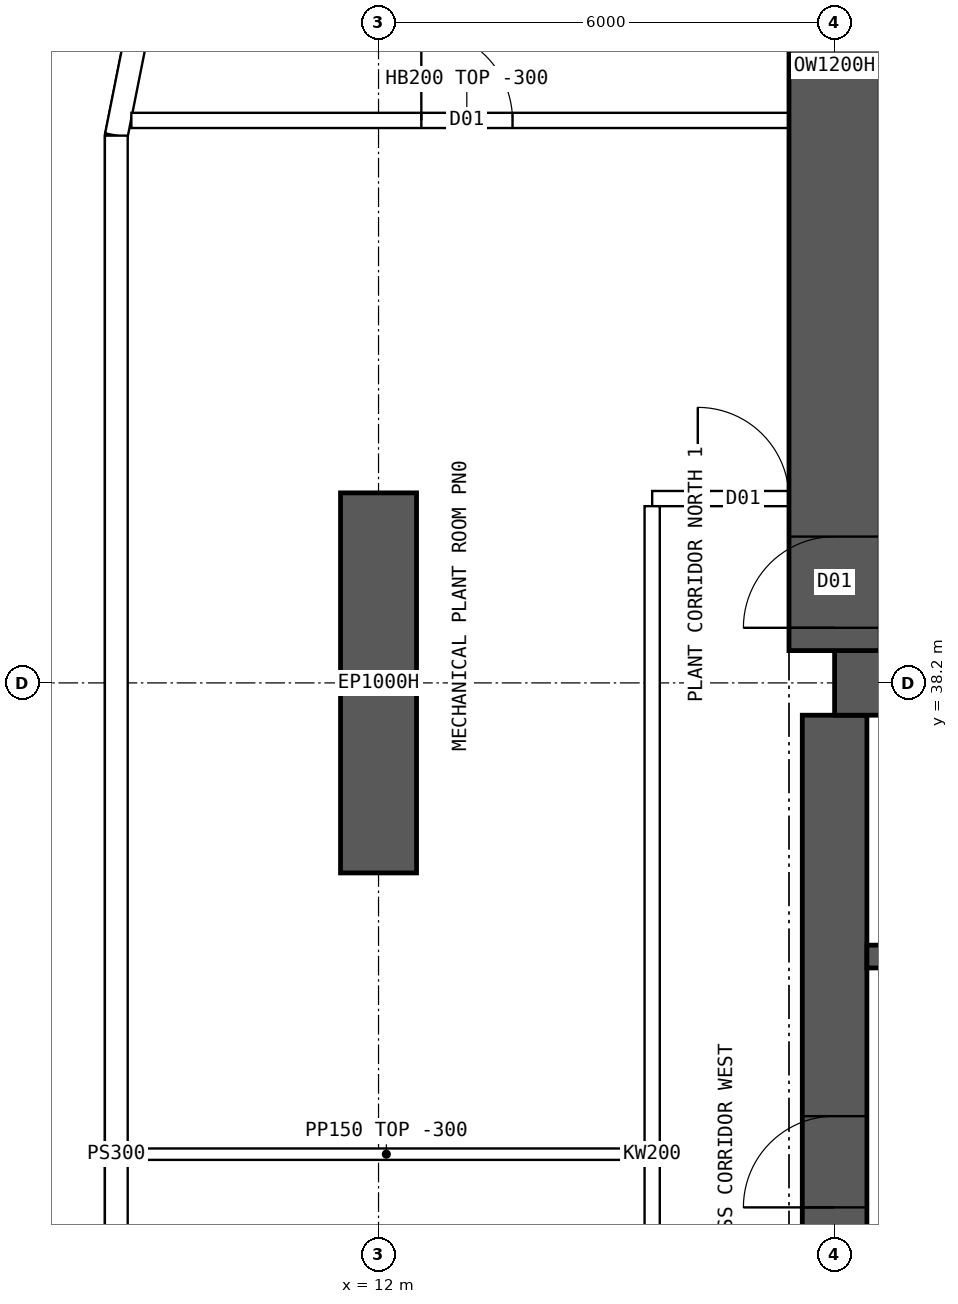
"""IFC4 building model, lengths in metres.
Left out: names, types, materials, properties, quantities, classifications, styles, units other than length and angle.
Written with IfcOpenShell. Run it as: python <this file> out.ifc"""

import sys

from ifc_helpers import new_model, si_unit, direction, frame, frame_2d, origin, place, context, subcontext, project, spatial, polyline, rectangle, outline, extrude, clip, halfspace, element, fill, save


model = new_model("IFC4")
c1 = context("Model", 3, precision=1e-05, world=origin(), true_north=direction((0.0, 1.0)))
c2 = subcontext(c1, "Body", "Model", "MODEL_VIEW")
j1 = project(units=[si_unit("LENGTHUNIT", "METRE"), si_unit("PLANEANGLEUNIT", "RADIAN")], contexts=[c1])
p1 = place(None, origin())
s1 = spatial("IfcSite", under=j1, at=p1, CompositionType="ELEMENT")
p2 = place(p1, origin())
s2 = spatial("IfcBuilding", under=s1, at=p2, CompositionType="ELEMENT")
p3 = place(p2, frame((0.0, 0.0, 201.1)))
s3 = spatial("IfcBuildingStorey", under=s2, at=p3, CompositionType="ELEMENT", Elevation=201.1)
p4 = place(p3, frame((12.0, 35.7, 0.0), z_axis=(0.0, 0.0, 1.0), x_axis=(0.0, 1.0, 0.0)))
e1 = element("IfcWall", 1, at=p4, inside=s3, PredefinedType="SHEAR", context=c2, shape_type="SweptSolid", body=[
    extrude(rectangle(XDim=5.0, YDim=1.0, at=frame_2d((2.5, 0.0))), origin(), (0.0, 0.0, 1.0), 7.2),
])
p5 = place(p3, frame((18.0, 38.2, 0.0), z_axis=(0.0, 0.0, 1.0), x_axis=(1.0, 0.0, 0.0)))
e2 = element("IfcWall", 2, at=p5, inside=s3, PredefinedType="SHEAR", context=c2, shape_type="SweptSolid", body=[
    extrude(rectangle(XDim=48.0, YDim=0.85, at=frame_2d((24.0, 0.0))), origin(), (0.0, 0.0, 1.0), 7.2),
])
p6 = place(p3, frame((18.0, 26.225, 0.0), z_axis=(0.0, 0.0, 1.0), x_axis=(0.0, 1.0, 0.0)))
e3 = element("IfcWall", 3, at=p6, inside=s3, PredefinedType="SHEAR", context=c2, shape_type="SweptSolid", body=[
    extrude(rectangle(XDim=11.55, YDim=0.85, at=frame_2d((5.775, 0.0))), origin(), (0.0, 0.0, 1.0), 7.2),
])
p7 = place(p6, frame((5.075, 0.0, 0.0)))
e4 = element("IfcOpeningElement", 4, at=p7, cuts=e3, PredefinedType="OPENING", context=c2, shape_type="SweptSolid", body=[
    extrude(rectangle(XDim=1.2, YDim=2.1, at=frame_2d((0.6, 1.05))), frame((0.0, 0.435, 0.0), z_axis=(0.0, -1.0, 0.0), x_axis=(1.0, 0.0, 0.0)), (0.0, 0.0, 1.0), 0.87),
])
p8 = place(p3, frame((18.425, 34.6, 0.0), z_axis=(0.0, 0.0, 1.0), x_axis=(1.0, 0.0, 0.0)))
e5 = element("IfcWall", 5, at=p8, inside=s3, PredefinedType="SHEAR", context=c2, shape_type="SweptSolid", body=[
    extrude(rectangle(XDim=47.15, YDim=0.3, at=frame_2d((23.575, 0.0))), origin(), (0.0, 0.0, 1.0), 7.2),
])
p9 = place(p8, frame((0.9, 0.0, 0.0)))
e6 = element("IfcOpeningElement", 6, at=p9, cuts=e5, PredefinedType="OPENING", context=c2, shape_type="SweptSolid", body=[
    extrude(rectangle(XDim=1.1, YDim=2.1, at=frame_2d((0.55, 1.05))), frame((0.0, 0.16, 0.0), z_axis=(0.0, -1.0, 0.0), x_axis=(1.0, 0.0, 0.0)), (0.0, 0.0, 1.0), 0.32),
])
p10 = place(p8, frame((45.15, 0.0, 0.0)))
e7 = element("IfcOpeningElement", 7, at=p10, cuts=e5, PredefinedType="OPENING", context=c2, shape_type="SweptSolid", body=[
    extrude(rectangle(XDim=1.1, YDim=2.1, at=frame_2d((0.55, 1.05))), frame((0.0, 0.16, 0.0), z_axis=(0.0, -1.0, 0.0), x_axis=(1.0, 0.0, 0.0)), (0.0, 0.0, 1.0), 0.32),
])
p11 = place(p8, frame((4.175, 0.0, 0.0)))
e8 = element("IfcOpeningElement", 8, at=p11, cuts=e5, PredefinedType="OPENING", context=c2, shape_type="SweptSolid", body=[
    extrude(rectangle(XDim=0.9, YDim=2.1, at=frame_2d((0.45, 1.05))), frame((0.0, 0.16, 0.0), z_axis=(0.0, -1.0, 0.0), x_axis=(1.0, 0.0, 0.0)), (0.0, 0.0, 1.0), 0.32),
])
p12 = place(p8, frame((42.075, 0.0, 0.0)))
e9 = element("IfcOpeningElement", 9, at=p12, cuts=e5, PredefinedType="OPENING", context=c2, shape_type="SweptSolid", body=[
    extrude(rectangle(XDim=0.9, YDim=2.1, at=frame_2d((0.45, 1.05))), frame((0.0, 0.16, 0.0), z_axis=(0.0, -1.0, 0.0), x_axis=(1.0, 0.0, 0.0)), (0.0, 0.0, 1.0), 0.32),
])
p13 = place(p8, frame((8.95, 0.0, 0.0)))
e10 = element("IfcOpeningElement", 10, at=p13, cuts=e5, PredefinedType="OPENING", context=c2, shape_type="SweptSolid", body=[
    extrude(rectangle(XDim=0.9, YDim=2.1, at=frame_2d((0.45, 1.05))), frame((0.0, 0.16, 0.0), z_axis=(0.0, -1.0, 0.0), x_axis=(1.0, 0.0, 0.0)), (0.0, 0.0, 1.0), 0.32),
])
p14 = place(p8, frame((12.924, 0.0, 0.0)))
e11 = element("IfcOpeningElement", 11, at=p14, cuts=e5, PredefinedType="OPENING", context=c2, shape_type="SweptSolid", body=[
    extrude(rectangle(XDim=0.9, YDim=2.1, at=frame_2d((0.45, 1.05))), frame((0.0, 0.16, 0.0), z_axis=(0.0, -1.0, 0.0), x_axis=(1.0, 0.0, 0.0)), (0.0, 0.0, 1.0), 0.32),
])
p15 = place(p8, frame((16.571, 0.0, 0.0)))
e12 = element("IfcOpeningElement", 12, at=p15, cuts=e5, PredefinedType="OPENING", context=c2, shape_type="SweptSolid", body=[
    extrude(rectangle(XDim=0.9, YDim=2.1, at=frame_2d((0.45, 1.05))), frame((0.0, 0.16, 0.0), z_axis=(0.0, -1.0, 0.0), x_axis=(1.0, 0.0, 0.0)), (0.0, 0.0, 1.0), 0.32),
])
p16 = place(p8, frame((20.33, 0.0, 0.0)))
e13 = element("IfcOpeningElement", 13, at=p16, cuts=e5, PredefinedType="OPENING", context=c2, shape_type="SweptSolid", body=[
    extrude(rectangle(XDim=0.9, YDim=2.1, at=frame_2d((0.45, 1.05))), frame((0.0, 0.16, 0.0), z_axis=(0.0, -1.0, 0.0), x_axis=(1.0, 0.0, 0.0)), (0.0, 0.0, 1.0), 0.32),
])
p17 = place(p8, frame((24.736, 0.0, 0.0)))
e14 = element("IfcOpeningElement", 14, at=p17, cuts=e5, PredefinedType="OPENING", context=c2, shape_type="SweptSolid", body=[
    extrude(rectangle(XDim=0.9, YDim=2.1, at=frame_2d((0.45, 1.05))), frame((0.0, 0.16, 0.0), z_axis=(0.0, -1.0, 0.0), x_axis=(1.0, 0.0, 0.0)), (0.0, 0.0, 1.0), 0.32),
])
p18 = place(p8, frame((27.533, 0.0, 0.0)))
e15 = element("IfcOpeningElement", 15, at=p18, cuts=e5, PredefinedType="OPENING", context=c2, shape_type="SweptSolid", body=[
    extrude(rectangle(XDim=0.9, YDim=2.1, at=frame_2d((0.45, 1.05))), frame((0.0, 0.16, 0.0), z_axis=(0.0, -1.0, 0.0), x_axis=(1.0, 0.0, 0.0)), (0.0, 0.0, 1.0), 0.32),
])
p19 = place(p8, frame((29.906, 0.0, 0.0)))
e16 = element("IfcOpeningElement", 16, at=p19, cuts=e5, PredefinedType="OPENING", context=c2, shape_type="SweptSolid", body=[
    extrude(rectangle(XDim=0.9, YDim=2.1, at=frame_2d((0.45, 1.05))), frame((0.0, 0.16, 0.0), z_axis=(0.0, -1.0, 0.0), x_axis=(1.0, 0.0, 0.0)), (0.0, 0.0, 1.0), 0.32),
])
p20 = place(p8, frame((35.376, 0.0, 0.0)))
e17 = element("IfcOpeningElement", 17, at=p20, cuts=e5, PredefinedType="OPENING", context=c2, shape_type="SweptSolid", body=[
    extrude(rectangle(XDim=0.9, YDim=2.1, at=frame_2d((0.45, 1.05))), frame((0.0, 0.16, 0.0), z_axis=(0.0, -1.0, 0.0), x_axis=(1.0, 0.0, 0.0)), (0.0, 0.0, 1.0), 0.32),
])
p21 = place(p3, frame((18.0, 38.625, 0.0), z_axis=(0.0, 0.0, 1.0), x_axis=(0.0, 1.0, 0.0)))
e18 = element("IfcWall", 18, at=p21, inside=s3, PredefinedType="SHEAR", context=c2, shape_type="SweptSolid", body=[
    extrude(rectangle(XDim=15.375, YDim=1.2, at=frame_2d((7.688, 0.0))), origin(), (0.0, 0.0, 1.0), 7.2),
])
p22 = place(p21, frame((0.3, 0.0, 0.0)))
e19 = element("IfcOpeningElement", 19, at=p22, cuts=e18, PredefinedType="OPENING", context=c2, shape_type="SweptSolid", body=[
    extrude(rectangle(XDim=1.2, YDim=2.1, at=frame_2d((0.6, 1.05))), frame((0.0, 0.61, 0.0), z_axis=(0.0, -1.0, 0.0), x_axis=(1.0, 0.0, 0.0)), (0.0, 0.0, 1.0), 1.22),
])
p23 = place(p21, frame((10.225, 0.0, 0.0)))
e20 = element("IfcOpeningElement", 20, at=p23, cuts=e18, PredefinedType="OPENING", context=c2, shape_type="SweptSolid", body=[
    extrude(rectangle(XDim=1.2, YDim=2.1, at=frame_2d((0.6, 1.05))), frame((0.0, 0.61, 0.0), z_axis=(0.0, -1.0, 0.0), x_axis=(1.0, 0.0, 0.0)), (0.0, 0.0, 1.0), 1.22),
])
p24 = place(p3, frame((8.55, 45.4, 0.0), z_axis=(0.0, 0.0, 1.0), x_axis=(0.0, -1.0, 0.0)))
e21 = element("IfcWall", 21, at=p24, inside=s3, PredefinedType="SOLIDWALL", context=c2, shape_type="SweptSolid", body=[
    extrude(outline(polyline([(-0.015, -0.15), (26.815, -0.15), (26.785, 0.15), (0.015, 0.15), (-0.015, -0.15)])), origin(), (0.0, 0.0, 1.0), 6.9),
])
p25 = place(p3, frame((9.208, 48.71, 0.0), z_axis=(0.0, 0.0, 1.0), x_axis=(-0.19508664885, -0.980786011034, 0.0)))
e22 = element("IfcWall", 22, at=p25, inside=s3, PredefinedType="SOLIDWALL", context=c2, shape_type="SweptSolid", body=[
    extrude(outline(polyline([(-0.03, -0.15), (3.39, -0.15), (3.36, 0.15), (0.03, 0.15), (-0.03, -0.15)])), origin(), (0.0, 0.0, 1.0), 6.9),
])
p26 = place(p3, frame((15.6, 40.625, 0.0), z_axis=(0.0, 0.0, 1.0), x_axis=(1.0, 0.0, 0.0)))
e23 = element("IfcWall", 23, at=p26, inside=s3, PredefinedType="SOLIDWALL", context=c2, shape_type="SweptSolid", body=[
    extrude(rectangle(XDim=52.8, YDim=0.2, at=frame_2d((26.4, 0.0))), origin(), (0.0, 0.0, 1.0), 6.9),
])
p27 = place(p26, frame((0.6, 0.0, 0.0)))
e24 = element("IfcOpeningElement", 24, at=p27, cuts=e23, PredefinedType="OPENING", context=c2, shape_type="SweptSolid", body=[
    extrude(rectangle(XDim=1.2, YDim=2.1, at=frame_2d((0.6, 1.05))), frame((0.0, 0.11, 0.0), z_axis=(0.0, -1.0, 0.0), x_axis=(1.0, 0.0, 0.0)), (0.0, 0.0, 1.0), 0.22),
])
p28 = place(p26, frame((3.425, 0.0, 0.0)))
e25 = element("IfcOpeningElement", 25, at=p28, cuts=e23, PredefinedType="OPENING", context=c2, shape_type="SweptSolid", body=[
    extrude(rectangle(XDim=1.8, YDim=2.4, at=frame_2d((0.9, 1.2))), frame((0.0, 0.11, 0.0), z_axis=(0.0, -1.0, 0.0), x_axis=(1.0, 0.0, 0.0)), (0.0, 0.0, 1.0), 0.22),
])
p29 = place(p26, frame((9.425, 0.0, 0.0)))
e26 = element("IfcOpeningElement", 26, at=p29, cuts=e23, PredefinedType="OPENING", context=c2, shape_type="SweptSolid", body=[
    extrude(rectangle(XDim=1.8, YDim=2.4, at=frame_2d((0.9, 1.2))), frame((0.0, 0.11, 0.0), z_axis=(0.0, -1.0, 0.0), x_axis=(1.0, 0.0, 0.0)), (0.0, 0.0, 1.0), 0.22),
])
p30 = place(p26, frame((15.425, 0.0, 0.0)))
e27 = element("IfcOpeningElement", 27, at=p30, cuts=e23, PredefinedType="OPENING", context=c2, shape_type="SweptSolid", body=[
    extrude(rectangle(XDim=1.8, YDim=2.4, at=frame_2d((0.9, 1.2))), frame((0.0, 0.11, 0.0), z_axis=(0.0, -1.0, 0.0), x_axis=(1.0, 0.0, 0.0)), (0.0, 0.0, 1.0), 0.22),
])
p31 = place(p26, frame((21.425, 0.0, 0.0)))
e28 = element("IfcOpeningElement", 28, at=p31, cuts=e23, PredefinedType="OPENING", context=c2, shape_type="SweptSolid", body=[
    extrude(rectangle(XDim=1.8, YDim=2.4, at=frame_2d((0.9, 1.2))), frame((0.0, 0.11, 0.0), z_axis=(0.0, -1.0, 0.0), x_axis=(1.0, 0.0, 0.0)), (0.0, 0.0, 1.0), 0.22),
])
p32 = place(p26, frame((27.425, 0.0, 0.0)))
e29 = element("IfcOpeningElement", 29, at=p32, cuts=e23, PredefinedType="OPENING", context=c2, shape_type="SweptSolid", body=[
    extrude(rectangle(XDim=1.8, YDim=2.4, at=frame_2d((0.9, 1.2))), frame((0.0, 0.11, 0.0), z_axis=(0.0, -1.0, 0.0), x_axis=(1.0, 0.0, 0.0)), (0.0, 0.0, 1.0), 0.22),
])
p33 = place(p26, frame((33.425, 0.0, 0.0)))
e30 = element("IfcOpeningElement", 30, at=p33, cuts=e23, PredefinedType="OPENING", context=c2, shape_type="SweptSolid", body=[
    extrude(rectangle(XDim=1.8, YDim=2.4, at=frame_2d((0.9, 1.2))), frame((0.0, 0.11, 0.0), z_axis=(0.0, -1.0, 0.0), x_axis=(1.0, 0.0, 0.0)), (0.0, 0.0, 1.0), 0.22),
])
p34 = place(p26, frame((39.425, 0.0, 0.0)))
e31 = element("IfcOpeningElement", 31, at=p34, cuts=e23, PredefinedType="OPENING", context=c2, shape_type="SweptSolid", body=[
    extrude(rectangle(XDim=1.8, YDim=2.4, at=frame_2d((0.9, 1.2))), frame((0.0, 0.11, 0.0), z_axis=(0.0, -1.0, 0.0), x_axis=(1.0, 0.0, 0.0)), (0.0, 0.0, 1.0), 0.22),
])
p35 = place(p26, frame((45.425, 0.0, 0.0)))
e32 = element("IfcOpeningElement", 32, at=p35, cuts=e23, PredefinedType="OPENING", context=c2, shape_type="SweptSolid", body=[
    extrude(rectangle(XDim=1.8, YDim=2.4, at=frame_2d((0.9, 1.2))), frame((0.0, 0.11, 0.0), z_axis=(0.0, -1.0, 0.0), x_axis=(1.0, 0.0, 0.0)), (0.0, 0.0, 1.0), 0.22),
])
p36 = place(p26, frame((51.425, 0.0, 0.0)))
e33 = element("IfcOpeningElement", 33, at=p36, cuts=e23, PredefinedType="OPENING", context=c2, shape_type="SweptSolid", body=[
    extrude(rectangle(XDim=1.2, YDim=2.1, at=frame_2d((0.6, 1.05))), frame((0.0, 0.11, 0.0), z_axis=(0.0, -1.0, 0.0), x_axis=(1.0, 0.0, 0.0)), (0.0, 0.0, 1.0), 0.22),
])
p37 = place(p3, frame((15.6, 23.475, 0.0), z_axis=(0.0, 0.0, 1.0), x_axis=(0.0, 1.0, 0.0)))
e34 = element("IfcWall", 34, at=p37, inside=s3, PredefinedType="SOLIDWALL", context=c2, shape_type="SweptSolid", body=[
    extrude(rectangle(XDim=17.05, YDim=0.2, at=frame_2d((8.525, 0.0))), origin(), (0.0, 0.0, 1.0), 6.9),
])
p38 = place(p3, frame((8.748, 45.6, 0.0), z_axis=(0.0, 0.0, 1.0), x_axis=(1.0, 0.0, 0.0)))
e35 = element("IfcWall", 35, at=p38, inside=s3, PredefinedType="SOLIDWALL", context=c2, shape_type="Clipping", body=[
    clip(clip(extrude(outline(polyline([(-0.03, 0.0), (8.857, 0.0), (8.857, 6.9), (3.554, 6.9), (3.552, 6.45), (2.954, 6.45), (2.952, 6.9), (-0.03, 6.9), (-0.03, 0.0)])), frame((0.0, 0.1, 0.0), z_axis=(0.0, -1.0, 0.0), x_axis=(1.0, 0.0, 0.0)), (0.0, 0.0, 1.0), 0.2), halfspace(frame((0.0, 0.0, 0.0), z_axis=(-0.980787601265, 0.195078653892, 0.0)), False)), halfspace(frame((8.827, 0.0, 0.0), z_axis=(1.0, 0.0, 0.0)), False)),
])
p39 = place(p38, frame((3.815, 0.0, 0.0)))
e36 = element("IfcOpeningElement", 36, at=p39, cuts=e35, PredefinedType="OPENING", context=c2, shape_type="SweptSolid", body=[
    extrude(rectangle(XDim=1.2, YDim=2.1, at=frame_2d((0.6, 1.05))), frame((0.0, 0.11, 0.0), z_axis=(0.0, -1.0, 0.0), x_axis=(1.0, 0.0, 0.0)), (0.0, 0.0, 1.0), 0.22),
])
p40 = place(p3, frame((18.425, 45.6, 0.0), z_axis=(0.0, 0.0, 1.0), x_axis=(1.0, 0.0, 0.0)))
e37 = element("IfcWall", 37, at=p40, inside=s3, PredefinedType="SOLIDWALL", context=c2, shape_type="SweptSolid", body=[
    extrude(rectangle(XDim=5.15, YDim=0.2, at=frame_2d((2.575, 0.0))), origin(), (0.0, 0.0, 1.0), 6.9),
])
p41 = place(p40, frame((1.975, 0.0, 0.0)))
e38 = element("IfcOpeningElement", 38, at=p41, cuts=e37, PredefinedType="OPENING", context=c2, shape_type="SweptSolid", body=[
    extrude(rectangle(XDim=1.2, YDim=2.1, at=frame_2d((0.6, 1.05))), frame((0.0, 0.11, 0.0), z_axis=(0.0, -1.0, 0.0), x_axis=(1.0, 0.0, 0.0)), (0.0, 0.0, 1.0), 0.22),
])
p42 = place(p3, frame((8.705, 32.0, 0.0), z_axis=(0.0, 0.0, 1.0), x_axis=(1.0, 0.0, 0.0)))
e39 = element("IfcWall", 39, at=p42, inside=s3, PredefinedType="PARTITIONING", context=c2, shape_type="SweptSolid", body=[
    extrude(outline(polyline([(0.0, 0.0), (6.795, 0.0), (6.795, 6.9), (3.597, 6.9), (3.595, 6.45), (2.997, 6.45), (2.995, 6.9), (0.0, 6.9), (0.0, 0.0)])), frame((0.0, 0.075, 0.0), z_axis=(0.0, -1.0, 0.0), x_axis=(1.0, 0.0, 0.0)), (0.0, 0.0, 1.0), 0.15),
])
p43 = place(p7, origin())
e40 = element("IfcDoor", 40, at=p43, inside=s3, OperationType="SINGLE_SWING_LEFT", PredefinedType="DOOR", context=c2, shape_type="SweptSolid", body=[
    extrude(rectangle(XDim=1.2, YDim=2.1, at=frame_2d((0.6, 1.05))), frame((0.0, 0.025, 0.0), z_axis=(0.0, -1.0, 0.0), x_axis=(1.0, 0.0, 0.0)), (0.0, 0.0, 1.0), 0.05),
])
fill(e4, e40)
p44 = place(p39, origin())
e41 = element("IfcDoor", 41, at=p44, inside=s3, OperationType="SINGLE_SWING_LEFT", PredefinedType="DOOR", context=c2, shape_type="SweptSolid", body=[
    extrude(rectangle(XDim=1.2, YDim=2.1, at=frame_2d((0.6, 1.05))), frame((0.0, 0.025, 0.0), z_axis=(0.0, -1.0, 0.0), x_axis=(1.0, 0.0, 0.0)), (0.0, 0.0, 1.0), 0.05),
])
fill(e36, e41)
p45 = place(p27, origin())
e42 = element("IfcDoor", 42, at=p45, inside=s3, OperationType="SINGLE_SWING_LEFT", PredefinedType="DOOR", context=c2, shape_type="SweptSolid", body=[
    extrude(rectangle(XDim=1.2, YDim=2.1, at=frame_2d((0.6, 1.05))), frame((0.0, 0.025, 0.0), z_axis=(0.0, -1.0, 0.0), x_axis=(1.0, 0.0, 0.0)), (0.0, 0.0, 1.0), 0.05),
])
fill(e24, e42)
p46 = place(p22, origin())
e43 = element("IfcDoor", 43, at=p46, inside=s3, OperationType="SINGLE_SWING_LEFT", PredefinedType="DOOR", context=c2, shape_type="SweptSolid", body=[
    extrude(rectangle(XDim=1.2, YDim=2.1, at=frame_2d((0.6, 1.05))), frame((0.0, 0.025, 0.0), z_axis=(0.0, -1.0, 0.0), x_axis=(1.0, 0.0, 0.0)), (0.0, 0.0, 1.0), 0.05),
])
fill(e19, e43)
save(model, sys.argv[1])
